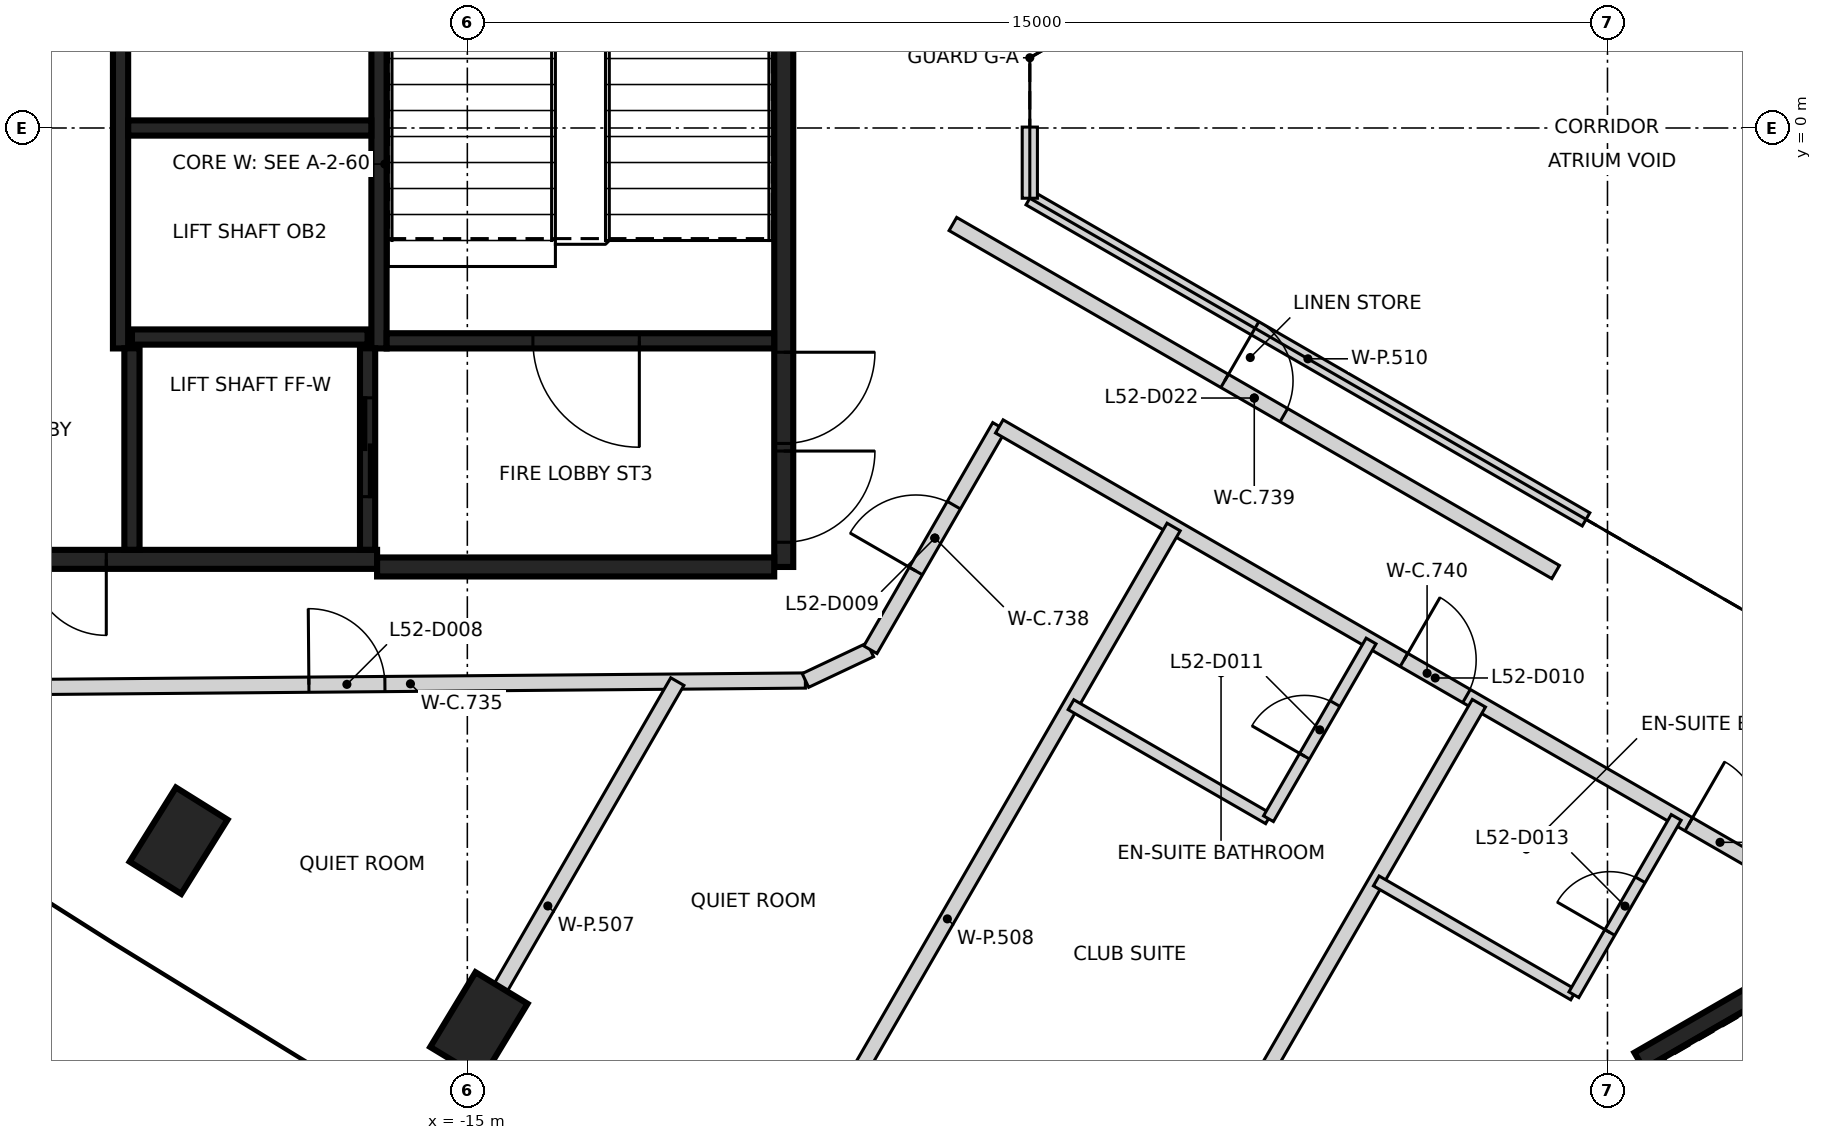
"""IFC4 building model, lengths in metres.
Left out: names, types, materials, properties, quantities, classifications, styles, units other than length and angle.
Written with IfcOpenShell. Run it as: python <this file> out.ifc"""

import sys

from ifc_helpers import new_model, si_unit, direction, frame, frame_2d, origin, origin_2d, place, context, subcontext, project, spatial, rectangle, extrude, element, fill, save


model = new_model("IFC4")
c1 = context("Model", 3, precision=1e-05, world=origin(), true_north=direction((0.0, 1.0)))
c2 = subcontext(c1, "Body", "Model", "MODEL_VIEW")
j1 = project(units=[si_unit("LENGTHUNIT", "METRE"), si_unit("PLANEANGLEUNIT", "RADIAN")], contexts=[c1])
p1 = place(None, origin())
s1 = spatial("IfcSite", under=j1, at=p1, CompositionType="ELEMENT")
p2 = place(p1, origin())
s2 = spatial("IfcBuilding", under=s1, at=p2, CompositionType="ELEMENT")
p3 = place(p2, frame((0.0, 0.0, 208.0)))
s3 = spatial("IfcBuildingStorey", under=s2, at=p3, CompositionType="ELEMENT", Elevation=208.0)
for number, where, z_axis, x_axis in (
    (1, (-18.799, -9.376, -0.35), (0.0, 0.0, 1.0), (0.529, 0.848, 0.0)),
    (2, (-14.848, -11.806, -0.35), (0.0, 0.0, 1.0), (0.518, 0.855, 0.0)),
):
    element("IfcColumn", number, at=place(p3, frame(where, z_axis=z_axis, x_axis=x_axis)), inside=s3, PredefinedType="COLUMN", context=c2, shape_type="SweptSolid", body=[
        extrude(rectangle(XDim=1.15, YDim=0.8, at=origin_2d()), origin(), (0.0, 0.0, 1.0), 2.736),
    ])
p4 = place(p3, frame((-10.837, 5.775, 0.0), z_axis=(0.0, 0.0, 1.0), x_axis=(0.0, -1.0, 0.0)))
e3 = element("IfcWall", 3, at=p4, inside=s3, PredefinedType="SHEAR", context=c2, shape_type="SweptSolid", body=[
    extrude(rectangle(XDim=11.55, YDim=0.25, at=frame_2d((5.775, 0.0))), origin(), (0.0, 0.0, 1.0), 3.2),
])
p5 = place(p4, frame((10.025, 0.0, 0.0)))
e4 = element("IfcOpeningElement", 4, at=p5, cuts=e3, PredefinedType="OPENING", context=c2, shape_type="SweptSolid", body=[
    extrude(rectangle(XDim=1.2, YDim=2.1, at=frame_2d((0.6, 1.05))), frame((0.0, 0.135, 0.0), z_axis=(0.0, -1.0, 0.0), x_axis=(1.0, 0.0, 0.0)), (0.0, 0.0, 1.0), 0.27),
])
p6 = place(p4, frame((8.725, 0.0, 0.0)))
e5 = element("IfcOpeningElement", 5, at=p6, cuts=e3, PredefinedType="OPENING", context=c2, shape_type="SweptSolid", body=[
    extrude(rectangle(XDim=1.2, YDim=2.1, at=frame_2d((0.6, 1.05))), frame((0.0, 0.135, 0.0), z_axis=(0.0, -1.0, 0.0), x_axis=(1.0, 0.0, 0.0)), (0.0, 0.0, 1.0), 0.27),
])
p7 = place(p3, frame((-16.187, -5.675, 0.0), z_axis=(0.0, 0.0, 1.0), x_axis=(-1.0, 0.0, 0.0)))
e6 = element("IfcWall", 6, at=p7, inside=s3, PredefinedType="SHEAR", context=c2, shape_type="SweptSolid", body=[
    extrude(rectangle(XDim=6.125, YDim=0.25, at=frame_2d((3.062, 0.0))), origin(), (0.0, 0.0, 1.0), 3.2),
])
p8 = place(p7, frame((3.563, 0.0, 0.0)))
e7 = element("IfcOpeningElement", 7, at=p8, cuts=e6, PredefinedType="OPENING", context=c2, shape_type="SweptSolid", body=[
    extrude(rectangle(XDim=1.0, YDim=2.1, at=frame_2d((0.5, 1.05))), frame((0.0, 0.135, 0.0), z_axis=(0.0, -1.0, 0.0), x_axis=(1.0, 0.0, 0.0)), (0.0, 0.0, 1.0), 0.27),
])
p9 = place(p3, frame((-10.963, -5.775, 0.0), z_axis=(0.0, 0.0, 1.0), x_axis=(-1.0, 0.0, 0.0)))
e8 = element("IfcWall", 8, at=p9, inside=s3, PredefinedType="SHEAR", context=c2, shape_type="SweptSolid", body=[
    extrude(rectangle(XDim=5.225, YDim=0.25, at=frame_2d((2.612, 0.0))), origin(), (0.0, 0.0, 1.0), 3.2),
])
p10 = place(p3, frame((-16.162, 3.074, 0.0), z_axis=(0.0, 0.0, 1.0), x_axis=(0.0, -1.0, 0.0)))
e9 = element("IfcWall", 9, at=p10, inside=s3, PredefinedType="SHEAR", context=c2, shape_type="SweptSolid", body=[
    extrude(rectangle(XDim=5.974, YDim=0.2, at=frame_2d((2.987, 0.0))), origin(), (0.0, 0.0, 1.0), 3.2),
])
p11 = place(p3, frame((-19.562, -2.9, 0.0), z_axis=(0.0, 0.0, 1.0), x_axis=(0.0, 1.0, 0.0)))
e10 = element("IfcWall", 10, at=p11, inside=s3, PredefinedType="SHEAR", context=c2, shape_type="SweptSolid", body=[
    extrude(rectangle(XDim=6.1, YDim=0.2, at=frame_2d((3.05, 0.0))), origin(), (0.0, 0.0, 1.0), 3.2),
])
p12 = place(p3, frame((-10.963, -2.8, 0.0), z_axis=(0.0, 0.0, 1.0), x_axis=(-1.0, 0.0, 0.0)))
e11 = element("IfcWall", 11, at=p12, inside=s3, PredefinedType="SHEAR", context=c2, shape_type="SweptSolid", body=[
    extrude(rectangle(XDim=5.098, YDim=0.2, at=frame_2d((2.549, 0.0))), origin(), (0.0, 0.0, 1.0), 3.2),
])
p13 = place(p12, frame((1.774, 0.0, 0.0)))
e12 = element("IfcOpeningElement", 12, at=p13, cuts=e11, PredefinedType="OPENING", context=c2, shape_type="SweptSolid", body=[
    extrude(rectangle(XDim=1.4, YDim=2.1, at=frame_2d((0.7, 1.05))), frame((0.0, 0.11, 0.0), z_axis=(0.0, -1.0, 0.0), x_axis=(1.0, 0.0, 0.0)), (0.0, 0.0, 1.0), 0.22),
])
p14 = place(p3, frame((-16.263, 0.0, 0.0), z_axis=(0.0, 0.0, 1.0), x_axis=(-1.0, 0.0, 0.0)))
e13 = element("IfcWall", 13, at=p14, inside=s3, PredefinedType="SHEAR", context=c2, shape_type="SweptSolid", body=[
    extrude(rectangle(XDim=3.198, YDim=0.2, at=frame_2d((1.599, 0.0))), origin(), (0.0, 0.0, 1.0), 3.2),
])
p15 = place(p3, frame((-19.412, -2.75, 0.0), z_axis=(0.0, 0.0, 1.0), x_axis=(1.0, 0.0, 0.0)))
e14 = element("IfcWall", 14, at=p15, inside=s3, PredefinedType="SHEAR", context=c2, shape_type="SweptSolid", body=[
    extrude(rectangle(XDim=3.1, YDim=0.2, at=frame_2d((1.55, 0.0))), origin(), (0.0, 0.0, 1.0), 3.2),
])
p16 = place(p3, frame((-16.312, -2.898, 0.0), z_axis=(0.0, 0.0, 1.0), x_axis=(0.0, -1.0, 0.0)))
e15 = element("IfcWall", 15, at=p16, inside=s3, PredefinedType="SHEAR", context=c2, shape_type="SweptSolid", body=[
    extrude(rectangle(XDim=2.651, YDim=0.2, at=frame_2d((1.325, 0.0))), origin(), (0.0, 0.0, 1.0), 3.2),
])
p17 = place(p16, frame((0.652, 0.0, 0.0)))
e16 = element("IfcOpeningElement", 16, at=p17, cuts=e15, PredefinedType="OPENING", context=c2, shape_type="SweptSolid", body=[
    extrude(rectangle(XDim=1.3, YDim=2.1, at=frame_2d((0.65, 1.05))), frame((0.0, 0.11, 0.0), z_axis=(0.0, -1.0, 0.0), x_axis=(1.0, 0.0, 0.0)), (0.0, 0.0, 1.0), 0.22),
])
p18 = place(p3, frame((-19.412, -5.549, 0.0), z_axis=(0.0, 0.0, 1.0), x_axis=(0.0, 1.0, 0.0)))
e17 = element("IfcWall", 17, at=p18, inside=s3, PredefinedType="SHEAR", context=c2, shape_type="SweptSolid", body=[
    extrude(rectangle(XDim=2.651, YDim=0.2, at=frame_2d((1.325, 0.0))), origin(), (0.0, 0.0, 1.0), 3.2),
])
p19 = place(p3, frame((0.417, -12.273, 0.0), z_axis=(0.0, 0.0, 1.0), x_axis=(0.866021906294, 0.500006057782, 0.0)))
e18 = element("IfcWall", 18, at=p19, inside=s3, PredefinedType="SHEAR", context=c2, shape_type="SweptSolid", body=[
    extrude(rectangle(XDim=11.55, YDim=0.25, at=frame_2d((5.775, 0.0))), origin(), (0.0, 0.0, 1.0), 3.2),
])
p20 = place(p19, frame((10.025, 0.0, 0.0)))
e19 = element("IfcOpeningElement", 19, at=p20, cuts=e18, PredefinedType="OPENING", context=c2, shape_type="SweptSolid", body=[
    extrude(rectangle(XDim=1.2, YDim=2.1, at=frame_2d((0.6, 1.05))), frame((0.0, 0.135, 0.0), z_axis=(0.0, -1.0, 0.0), x_axis=(1.0, 0.0, 0.0)), (0.0, 0.0, 1.0), 0.27),
])
p21 = place(p19, frame((8.725, 0.0, 0.0)))
e20 = element("IfcOpeningElement", 20, at=p21, cuts=e18, PredefinedType="OPENING", context=c2, shape_type="SweptSolid", body=[
    extrude(rectangle(XDim=1.2, YDim=2.1, at=frame_2d((0.6, 1.05))), frame((0.0, 0.135, 0.0), z_axis=(0.0, -1.0, 0.0), x_axis=(1.0, 0.0, 0.0)), (0.0, 0.0, 1.0), 0.27),
])
p22 = place(p3, frame((-20.944, -7.356, 0.0), z_axis=(0.0, 0.0, 1.0), x_axis=(0.999965021341, 0.008363976025, 0.0)))
e21 = element("IfcWall", 21, at=p22, inside=s3, PredefinedType="PARTITIONING", context=c2, shape_type="SweptSolid", body=[
    extrude(rectangle(XDim=10.391, YDim=0.2, at=frame_2d((5.196, 0.0))), origin(), (0.0, 0.0, 1.0), 3.2),
])
p23 = place(p22, frame((3.86, 0.0, 0.0)))
e22 = element("IfcOpeningElement", 22, at=p23, cuts=e21, PredefinedType="OPENING", context=c2, shape_type="SweptSolid", body=[
    extrude(rectangle(XDim=1.0, YDim=2.1, at=frame_2d((0.5, 1.05))), frame((0.0, 0.11, 0.0), z_axis=(0.0, -1.0, 0.0), x_axis=(1.0, 0.0, 0.0)), (0.0, 0.0, 1.0), 0.22),
])
p24 = place(p3, frame((-10.552, -7.268, 0.0), z_axis=(0.0, 0.0, 1.0), x_axis=(0.904331815333, 0.426830139255, 0.0)))
e23 = element("IfcWall", 23, at=p24, inside=s3, PredefinedType="PARTITIONING", context=c2, shape_type="SweptSolid", body=[
    extrude(rectangle(XDim=0.944, YDim=0.2, at=frame_2d((0.472, 0.0))), origin(), (0.0, 0.0, 1.0), 3.2),
])
p25 = place(p3, frame((-9.697, -6.864, 0.0), z_axis=(0.0, 0.0, 1.0), x_axis=(0.499955030392, 0.866051365443, 0.0)))
e24 = element("IfcWall", 24, at=p25, inside=s3, PredefinedType="PARTITIONING", context=c2, shape_type="SweptSolid", body=[
    extrude(rectangle(XDim=3.392, YDim=0.2, at=frame_2d((1.696, 0.0))), origin(), (0.0, 0.0, 1.0), 3.2),
])
p26 = place(p25, frame((1.196, 0.0, 0.0)))
e25 = element("IfcOpeningElement", 25, at=p26, cuts=e24, PredefinedType="OPENING", context=c2, shape_type="SweptSolid", body=[
    extrude(rectangle(XDim=1.0, YDim=2.1, at=frame_2d((0.5, 1.05))), frame((0.0, 0.11, 0.0), z_axis=(0.0, -1.0, 0.0), x_axis=(1.0, 0.0, 0.0)), (0.0, 0.0, 1.0), 0.22),
])
p27 = place(p3, frame((-8.612, -1.263, 0.0), z_axis=(0.0, 0.0, 1.0), x_axis=(0.865996442381, -0.500050159267, 0.0)))
e26 = element("IfcWall", 26, at=p27, inside=s3, PredefinedType="PARTITIONING", context=c2, shape_type="SweptSolid", body=[
    extrude(rectangle(XDim=9.157, YDim=0.2, at=frame_2d((4.579, 0.0))), origin(), (0.0, 0.0, 1.0), 3.2),
])
p28 = place(p27, frame((4.128, 0.0, 0.0)))
e27 = element("IfcOpeningElement", 27, at=p28, cuts=e26, PredefinedType="OPENING", context=c2, shape_type="SweptSolid", body=[
    extrude(rectangle(XDim=0.9, YDim=2.1, at=frame_2d((0.45, 1.05))), frame((0.0, 0.11, 0.0), z_axis=(0.0, -1.0, 0.0), x_axis=(1.0, 0.0, 0.0)), (0.0, 0.0, 1.0), 0.22),
])
p29 = place(p3, frame((-8.001, -3.926, 0.0), z_axis=(0.0, 0.0, 1.0), x_axis=(0.866131158271, -0.499816783104, 0.0)))
e28 = element("IfcWall", 28, at=p29, inside=s3, PredefinedType="PARTITIONING", context=c2, shape_type="SweptSolid", body=[
    extrude(rectangle(XDim=12.995, YDim=0.2, at=frame_2d((6.498, 0.0))), origin(), (0.0, 0.0, 1.0), 3.2),
])
p30 = place(p29, frame((6.146, 0.0, 0.0)))
e29 = element("IfcOpeningElement", 29, at=p30, cuts=e28, PredefinedType="OPENING", context=c2, shape_type="SweptSolid", body=[
    extrude(rectangle(XDim=0.95, YDim=2.1, at=frame_2d((0.475, 1.05))), frame((0.0, 0.11, 0.0), z_axis=(0.0, -1.0, 0.0), x_axis=(1.0, 0.0, 0.0)), (0.0, 0.0, 1.0), 0.22),
])
p31 = place(p29, frame((10.472, 0.0, 0.0)))
e30 = element("IfcOpeningElement", 30, at=p31, cuts=e28, PredefinedType="OPENING", context=c2, shape_type="SweptSolid", body=[
    extrude(rectangle(XDim=0.95, YDim=2.1, at=frame_2d((0.475, 1.05))), frame((0.0, 0.11, 0.0), z_axis=(0.0, -1.0, 0.0), x_axis=(1.0, 0.0, 0.0)), (0.0, 0.0, 1.0), 0.22),
])
p32 = place(p3, frame((-15.645, -13.187, 0.0), z_axis=(0.0, 0.0, 1.0), x_axis=(0.499921913572, 0.866070482311, 0.0)))
e31 = element("IfcWall", 31, at=p32, inside=s3, PredefinedType="PARTITIONING", context=c2, shape_type="SweptSolid", body=[
    extrude(rectangle(XDim=6.816, YDim=0.2, at=frame_2d((3.408, 0.0))), origin(), (0.0, 0.0, 1.0), 3.2),
])
p33 = place(p3, frame((-11.661, -15.561, 0.0), z_axis=(0.0, 0.0, 1.0), x_axis=(0.500000523332, 0.866025101638, 0.0)))
e32 = element("IfcWall", 32, at=p33, inside=s3, PredefinedType="PARTITIONING", context=c2, shape_type="SweptSolid", body=[
    extrude(rectangle(XDim=11.907, YDim=0.2, at=frame_2d((5.953, 0.0))), origin(), (0.0, 0.0, 1.0), 3.2),
])
p34 = place(p3, frame((-7.6, -0.924, 0.0), z_axis=(0.0, 0.0, 1.0), x_axis=(0.866038843867, -0.499976720371, 0.0)))
e33 = element("IfcWall", 33, at=p34, inside=s3, PredefinedType="PARTITIONING", context=c2, shape_type="SweptSolid", body=[
    extrude(rectangle(XDim=8.45, YDim=0.2, at=frame_2d((4.225, 0.0))), origin(), (0.0, 0.0, 1.0), 3.2),
])
p35 = place(p3, frame((-7.6, -0.924, 0.0), z_axis=(0.0, 0.0, 1.0), x_axis=(0.0, 1.0, 0.0)))
e34 = element("IfcWall", 34, at=p35, inside=s3, PredefinedType="PARTITIONING", context=c2, shape_type="SweptSolid", body=[
    extrude(rectangle(XDim=0.936, YDim=0.2, at=frame_2d((0.468, 0.0))), origin(), (0.0, 0.0, 1.0), 3.2),
])
p36 = place(p3, frame((-7.646, -17.879, 0.0), z_axis=(0.0, 0.0, 1.0), x_axis=(0.500042538917, 0.866000842536, 0.0)))
e35 = element("IfcWall", 35, at=p36, inside=s3, PredefinedType="PARTITIONING", context=c2, shape_type="SweptSolid", body=[
    extrude(rectangle(XDim=11.906, YDim=0.2, at=frame_2d((5.953, 0.0))), origin(), (0.0, 0.0, 1.0), 3.2),
])
p37 = place(p3, frame((-7.058, -7.587, 0.0), z_axis=(0.0, 0.0, 1.0), x_axis=(0.866031096941, -0.499990139034, 0.0)))
e36 = element("IfcWall", 36, at=p37, inside=s3, PredefinedType="PARTITIONING", context=c2, shape_type="SweptSolid", body=[
    extrude(rectangle(XDim=3.0, YDim=0.15, at=frame_2d((1.5, 0.0))), origin(), (0.0, 0.0, 1.0), 3.2),
])
p38 = place(p3, frame((-4.46, -9.087, 0.0), z_axis=(0.0, 0.0, 1.0), x_axis=(0.50001992892, 0.866013897511, 0.0)))
e37 = element("IfcWall", 37, at=p38, inside=s3, PredefinedType="PARTITIONING", context=c2, shape_type="SweptSolid", body=[
    extrude(rectangle(XDim=2.7, YDim=0.15, at=frame_2d((1.35, 0.0))), origin(), (0.0, 0.0, 1.0), 3.2),
])
p39 = place(p38, frame((0.95, 0.0, 0.0)))
e38 = element("IfcOpeningElement", 38, at=p39, cuts=e37, PredefinedType="OPENING", context=c2, shape_type="SweptSolid", body=[
    extrude(rectangle(XDim=0.8, YDim=2.1, at=frame_2d((0.4, 1.05))), frame((0.0, 0.085, 0.0), z_axis=(0.0, -1.0, 0.0), x_axis=(1.0, 0.0, 0.0)), (0.0, 0.0, 1.0), 0.17),
])
p40 = place(p3, frame((-3.042, -9.906, 0.0), z_axis=(0.0, 0.0, 1.0), x_axis=(0.866009279501, -0.500027927039, 0.0)))
e39 = element("IfcWall", 39, at=p40, inside=s3, PredefinedType="PARTITIONING", context=c2, shape_type="SweptSolid", body=[
    extrude(rectangle(XDim=2.998, YDim=0.15, at=frame_2d((1.499, 0.0))), origin(), (0.0, 0.0, 1.0), 3.2),
])
p41 = place(p3, frame((-0.442, -11.403, 0.0), z_axis=(0.0, 0.0, 1.0), x_axis=(0.499717222117, 0.866188604127, 0.0)))
e40 = element("IfcWall", 40, at=p41, inside=s3, PredefinedType="PARTITIONING", context=c2, shape_type="SweptSolid", body=[
    extrude(rectangle(XDim=2.693, YDim=0.15, at=frame_2d((1.347, 0.0))), origin(), (0.0, 0.0, 1.0), 3.2),
])
p42 = place(p41, frame((0.946, 0.0, 0.0)))
e41 = element("IfcOpeningElement", 41, at=p42, cuts=e40, PredefinedType="OPENING", context=c2, shape_type="SweptSolid", body=[
    extrude(rectangle(XDim=0.8, YDim=2.1, at=frame_2d((0.4, 1.05))), frame((0.0, 0.085, 0.0), z_axis=(0.0, -1.0, 0.0), x_axis=(1.0, 0.0, 0.0)), (0.0, 0.0, 1.0), 0.17),
])
p43 = place(p17, origin())
e42 = element("IfcDoor", 42, at=p43, inside=s3, OperationType="SLIDING_TO_RIGHT", PredefinedType="DOOR", context=c2, shape_type="SweptSolid", body=[
    extrude(rectangle(XDim=1.3, YDim=2.1, at=frame_2d((0.65, 1.05))), frame((0.0, 0.025, 0.0), z_axis=(0.0, -1.0, 0.0), x_axis=(1.0, 0.0, 0.0)), (0.0, 0.0, 1.0), 0.05),
])
fill(e16, e42)
p44 = place(p8, origin())
e43 = element("IfcDoor", 43, at=p44, inside=s3, OperationType="SINGLE_SWING_LEFT", PredefinedType="DOOR", context=c2, shape_type="SweptSolid", body=[
    extrude(rectangle(XDim=1.0, YDim=2.1, at=frame_2d((0.5, 1.05))), frame((0.0, 0.025, 0.0), z_axis=(0.0, -1.0, 0.0), x_axis=(1.0, 0.0, 0.0)), (0.0, 0.0, 1.0), 0.05),
])
fill(e7, e43)
p45 = place(p5, origin())
e44 = element("IfcDoor", 44, at=p45, inside=s3, OperationType="SINGLE_SWING_LEFT", PredefinedType="DOOR", context=c2, shape_type="SweptSolid", body=[
    extrude(rectangle(XDim=1.2, YDim=2.1, at=frame_2d((0.6, 1.05))), frame((0.0, 0.025, 0.0), z_axis=(0.0, -1.0, 0.0), x_axis=(1.0, 0.0, 0.0)), (0.0, 0.0, 1.0), 0.05),
])
fill(e4, e44)
p46 = place(p6, origin())
e45 = element("IfcDoor", 45, at=p46, inside=s3, OperationType="SINGLE_SWING_RIGHT", PredefinedType="DOOR", context=c2, shape_type="SweptSolid", body=[
    extrude(rectangle(XDim=1.2, YDim=2.1, at=frame_2d((0.6, 1.05))), frame((0.0, 0.025, 0.0), z_axis=(0.0, -1.0, 0.0), x_axis=(1.0, 0.0, 0.0)), (0.0, 0.0, 1.0), 0.05),
])
fill(e5, e45)
p47 = place(p13, origin())
e46 = element("IfcDoor", 46, at=p47, inside=s3, OperationType="SINGLE_SWING_RIGHT", PredefinedType="DOOR", context=c2, shape_type="SweptSolid", body=[
    extrude(rectangle(XDim=1.4, YDim=2.1, at=frame_2d((0.7, 1.05))), frame((0.0, 0.025, 0.0), z_axis=(0.0, -1.0, 0.0), x_axis=(1.0, 0.0, 0.0)), (0.0, 0.0, 1.0), 0.05),
])
fill(e12, e46)
p48 = place(p23, frame((1.0, 0.0, 0.0), z_axis=(0.0, 0.0, 1.0), x_axis=(-1.0, 0.0, 0.0)))
e47 = element("IfcDoor", 47, at=p48, inside=s3, OperationType="SINGLE_SWING_LEFT", PredefinedType="DOOR", context=c2, shape_type="SweptSolid", body=[
    extrude(rectangle(XDim=1.0, YDim=2.1, at=frame_2d((0.5, 1.05))), frame((0.0, 0.025, 0.0), z_axis=(0.0, -1.0, 0.0), x_axis=(1.0, 0.0, 0.0)), (0.0, 0.0, 1.0), 0.05),
])
fill(e22, e47)
p49 = place(p26, frame((1.0, 0.0, 0.0), z_axis=(0.0, 0.0, 1.0), x_axis=(-1.0, 0.0, 0.0)))
e48 = element("IfcDoor", 48, at=p49, inside=s3, OperationType="SINGLE_SWING_LEFT", PredefinedType="DOOR", context=c2, shape_type="SweptSolid", body=[
    extrude(rectangle(XDim=1.0, YDim=2.1, at=frame_2d((0.5, 1.05))), frame((0.0, 0.025, 0.0), z_axis=(0.0, -1.0, 0.0), x_axis=(1.0, 0.0, 0.0)), (0.0, 0.0, 1.0), 0.05),
])
fill(e25, e48)
p50 = place(p30, frame((0.95, 0.0, 0.0), z_axis=(0.0, 0.0, 1.0), x_axis=(-1.0, 0.0, 0.0)))
e49 = element("IfcDoor", 49, at=p50, inside=s3, OperationType="SINGLE_SWING_LEFT", PredefinedType="DOOR", context=c2, shape_type="SweptSolid", body=[
    extrude(rectangle(XDim=0.95, YDim=2.1, at=frame_2d((0.475, 1.05))), frame((0.0, 0.025, 0.0), z_axis=(0.0, -1.0, 0.0), x_axis=(1.0, 0.0, 0.0)), (0.0, 0.0, 1.0), 0.05),
])
fill(e29, e49)
p51 = place(p39, origin())
e50 = element("IfcDoor", 50, at=p51, inside=s3, OperationType="SINGLE_SWING_LEFT", PredefinedType="DOOR", context=c2, shape_type="SweptSolid", body=[
    extrude(rectangle(XDim=0.8, YDim=2.1, at=frame_2d((0.4, 1.05))), frame((0.0, 0.025, 0.0), z_axis=(0.0, -1.0, 0.0), x_axis=(1.0, 0.0, 0.0)), (0.0, 0.0, 1.0), 0.05),
])
fill(e38, e50)
p52 = place(p31, frame((0.95, 0.0, 0.0), z_axis=(0.0, 0.0, 1.0), x_axis=(-1.0, 0.0, 0.0)))
e51 = element("IfcDoor", 51, at=p52, inside=s3, OperationType="SINGLE_SWING_LEFT", PredefinedType="DOOR", context=c2, shape_type="SweptSolid", body=[
    extrude(rectangle(XDim=0.95, YDim=2.1, at=frame_2d((0.475, 1.05))), frame((0.0, 0.025, 0.0), z_axis=(0.0, -1.0, 0.0), x_axis=(1.0, 0.0, 0.0)), (0.0, 0.0, 1.0), 0.05),
])
fill(e30, e51)
p53 = place(p42, frame((0.8, 0.0, 0.0), z_axis=(0.0, 0.0, 1.0), x_axis=(-1.0, 0.0, 0.0)))
e52 = element("IfcDoor", 52, at=p53, inside=s3, OperationType="SINGLE_SWING_LEFT", PredefinedType="DOOR", context=c2, shape_type="SweptSolid", body=[
    extrude(rectangle(XDim=0.8, YDim=2.1, at=frame_2d((0.4, 1.05))), frame((0.0, 0.025, 0.0), z_axis=(0.0, -1.0, 0.0), x_axis=(1.0, 0.0, 0.0)), (0.0, 0.0, 1.0), 0.05),
])
fill(e41, e52)
p54 = place(p28, origin())
e53 = element("IfcDoor", 53, at=p54, inside=s3, OperationType="SINGLE_SWING_LEFT", PredefinedType="DOOR", context=c2, shape_type="SweptSolid", body=[
    extrude(rectangle(XDim=0.9, YDim=2.1, at=frame_2d((0.45, 1.05))), frame((0.0, 0.025, 0.0), z_axis=(0.0, -1.0, 0.0), x_axis=(1.0, 0.0, 0.0)), (0.0, 0.0, 1.0), 0.05),
])
fill(e27, e53)
save(model, sys.argv[1])
